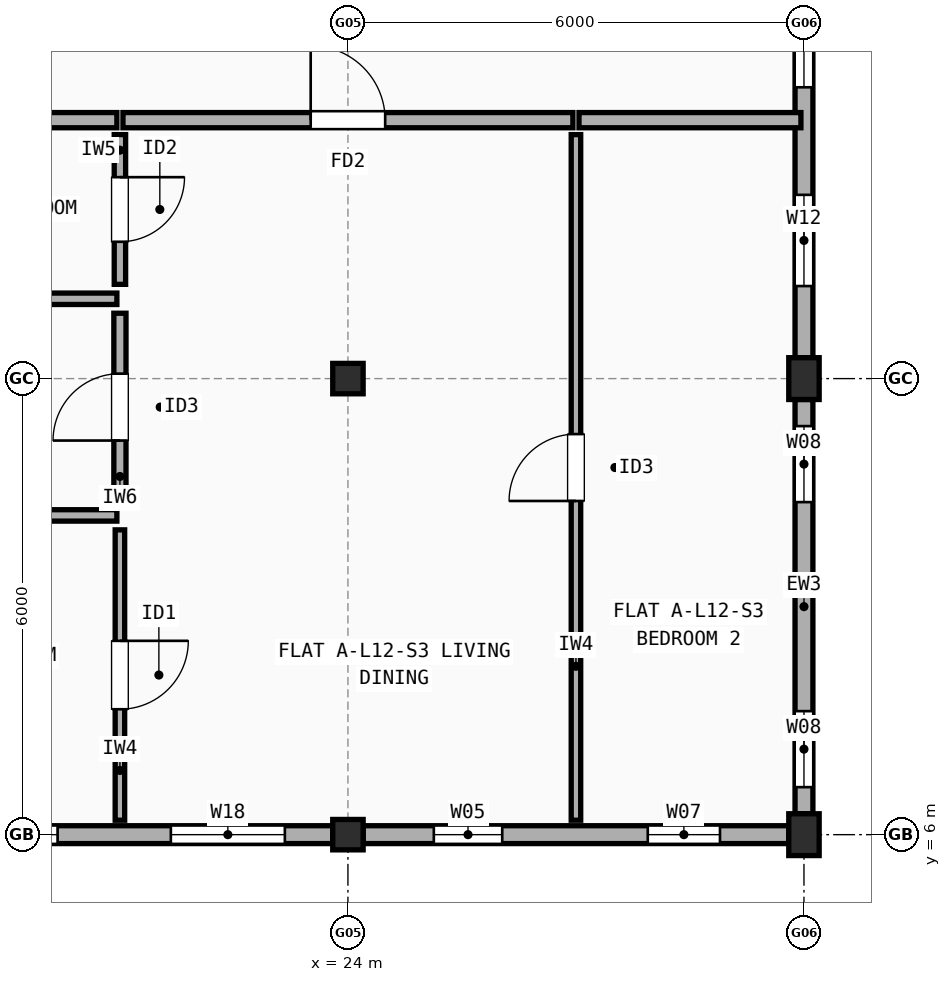
"""IFC4 building model, lengths in metres.
Left out: names, types, materials, properties, quantities, classifications, styles, units other than length and angle.
Written with IfcOpenShell. Run it as: python <this file> out.ifc"""

import sys

from ifc_helpers import new_model, si_unit, direction, frame, frame_2d, origin, origin_2d, place, context, subcontext, project, spatial, rectangle, extrude, element, fill, save


model = new_model("IFC4")
c1 = context("Model", 3, precision=1e-05, world=origin(), true_north=direction((0.0, 1.0)))
c2 = subcontext(c1, "Body", "Model", "MODEL_VIEW")
j1 = project(units=[si_unit("LENGTHUNIT", "METRE"), si_unit("PLANEANGLEUNIT", "RADIAN")], contexts=[c1])
p1 = place(None, origin())
s1 = spatial("IfcSite", under=j1, at=p1, CompositionType="ELEMENT")
p2 = place(p1, origin())
s2 = spatial("IfcBuilding", under=s1, at=p2, CompositionType="ELEMENT")
p3 = place(p2, frame((0.0, 0.0, 39.7)))
s3 = spatial("IfcBuildingStorey", under=s2, at=p3, CompositionType="ELEMENT", Elevation=39.7)
for number, where, z_axis, x_axis in (
    (1, (24.0, 6.0, 0.0), (0.0, 0.0, 1.0), (1.0, 0.0, 0.0)),
    (2, (24.0, 12.0, 0.0), (0.0, 0.0, 1.0), (1.0, 0.0, 0.0)),
):
    element("IfcColumn", number, at=place(p3, frame(where, z_axis=z_axis, x_axis=x_axis)), inside=s3, PredefinedType="COLUMN", context=c2, shape_type="SweptSolid", body=[
        extrude(rectangle(XDim=0.4, YDim=0.4, at=origin_2d()), origin(), (0.0, 0.0, 1.0), 3.0),
    ])
for number, where, z_axis, x_axis in (
    (3, (30.0, 6.0, 0.0), (0.0, 0.0, 1.0), (1.0, 0.0, 0.0)),
    (4, (30.0, 12.0, 0.0), (0.0, 0.0, 1.0), (1.0, 0.0, 0.0)),
):
    element("IfcColumn", number, at=place(p3, frame(where, z_axis=z_axis, x_axis=x_axis)), inside=s3, PredefinedType="COLUMN", context=c2, shape_type="SweptSolid", body=[
        extrude(rectangle(XDim=0.4, YDim=0.55, at=origin_2d()), origin(), (0.0, 0.0, 1.0), 3.0),
    ])
p4 = place(p3, frame((18.2, 6.0, 0.0), z_axis=(0.0, 0.0, 1.0), x_axis=(1.0, 0.0, 0.0)))
e5 = element("IfcWall", 5, at=p4, inside=s3, PredefinedType="STANDARD", context=c2, shape_type="SweptSolid", body=[
    extrude(rectangle(XDim=5.6, YDim=0.235, at=frame_2d((2.8, 0.0))), origin(), (0.0, 0.0, 1.0), 2.482),
])
p5 = place(p4, frame((0.78, 0.0, 0.9)))
e6 = element("IfcOpeningElement", 6, at=p5, cuts=e5, PredefinedType="OPENING", context=c2, shape_type="SweptSolid", body=[
    extrude(rectangle(XDim=1.2, YDim=1.35, at=frame_2d((0.6, 0.675))), frame((0.0, 0.127, 0.0), z_axis=(0.0, -1.0, 0.0), x_axis=(1.0, 0.0, 0.0)), (0.0, 0.0, 1.0), 0.255),
])
p6 = place(p4, frame((3.47, 0.0, 0.9)))
e7 = element("IfcOpeningElement", 7, at=p6, cuts=e5, PredefinedType="OPENING", context=c2, shape_type="SweptSolid", body=[
    extrude(rectangle(XDim=1.5, YDim=1.4, at=frame_2d((0.75, 0.7))), frame((0.0, 0.127, 0.0), z_axis=(0.0, -1.0, 0.0), x_axis=(1.0, 0.0, 0.0)), (0.0, 0.0, 1.0), 0.255),
])
p7 = place(p3, frame((24.2, 6.0, 0.0), z_axis=(0.0, 0.0, 1.0), x_axis=(1.0, 0.0, 0.0)))
e8 = element("IfcWall", 8, at=p7, inside=s3, PredefinedType="STANDARD", context=c2, shape_type="SweptSolid", body=[
    extrude(rectangle(XDim=5.6, YDim=0.235, at=frame_2d((2.8, 0.0))), origin(), (0.0, 0.0, 1.0), 2.482),
])
p8 = place(p7, frame((0.93, 0.0, 0.9)))
e9 = element("IfcOpeningElement", 9, at=p8, cuts=e8, PredefinedType="OPENING", context=c2, shape_type="SweptSolid", body=[
    extrude(rectangle(XDim=0.9, YDim=1.4, at=frame_2d((0.45, 0.7))), frame((0.0, 0.127, 0.0), z_axis=(0.0, -1.0, 0.0), x_axis=(1.0, 0.0, 0.0)), (0.0, 0.0, 1.0), 0.255),
])
p9 = place(p7, frame((3.745, 0.0, 0.9)))
e10 = element("IfcOpeningElement", 10, at=p9, cuts=e8, PredefinedType="OPENING", context=c2, shape_type="SweptSolid", body=[
    extrude(rectangle(XDim=0.95, YDim=1.35, at=frame_2d((0.475, 0.675))), frame((0.0, 0.127, 0.0), z_axis=(0.0, -1.0, 0.0), x_axis=(1.0, 0.0, 0.0)), (0.0, 0.0, 1.0), 0.255),
])
p10 = place(p3, frame((30.0, 6.275, 0.0), z_axis=(0.0, 0.0, 1.0), x_axis=(0.0, 1.0, 0.0)))
e11 = element("IfcWall", 11, at=p10, inside=s3, PredefinedType="STANDARD", context=c2, shape_type="SweptSolid", body=[
    extrude(rectangle(XDim=5.45, YDim=0.235, at=frame_2d((2.725, 0.0))), origin(), (0.0, 0.0, 1.0), 2.482),
])
p11 = place(p10, frame((0.35, 0.0, 0.9)))
e12 = element("IfcOpeningElement", 12, at=p11, cuts=e11, PredefinedType="OPENING", context=c2, shape_type="SweptSolid", body=[
    extrude(rectangle(XDim=1.0, YDim=1.4, at=frame_2d((0.5, 0.7))), frame((0.0, 0.127, 0.0), z_axis=(0.0, -1.0, 0.0), x_axis=(1.0, 0.0, 0.0)), (0.0, 0.0, 1.0), 0.255),
])
p12 = place(p10, frame((4.1, 0.0, 0.9)))
e13 = element("IfcOpeningElement", 13, at=p12, cuts=e11, PredefinedType="OPENING", context=c2, shape_type="SweptSolid", body=[
    extrude(rectangle(XDim=1.0, YDim=1.4, at=frame_2d((0.5, 0.7))), frame((0.0, 0.127, 0.0), z_axis=(0.0, -1.0, 0.0), x_axis=(1.0, 0.0, 0.0)), (0.0, 0.0, 1.0), 0.255),
])
p13 = place(p3, frame((30.0, 12.275, 0.0), z_axis=(0.0, 0.0, 1.0), x_axis=(0.0, 1.0, 0.0)))
e14 = element("IfcWall", 14, at=p13, inside=s3, PredefinedType="STANDARD", context=c2, shape_type="SweptSolid", body=[
    extrude(rectangle(XDim=5.45, YDim=0.235, at=frame_2d((2.725, 0.0))), origin(), (0.0, 0.0, 1.0), 2.482),
])
p14 = place(p13, frame((0.942, 0.0, 0.9)))
e15 = element("IfcOpeningElement", 15, at=p14, cuts=e14, PredefinedType="OPENING", context=c2, shape_type="SweptSolid", body=[
    extrude(rectangle(XDim=1.2, YDim=1.35, at=frame_2d((0.6, 0.675))), frame((0.0, 0.127, 0.0), z_axis=(0.0, -1.0, 0.0), x_axis=(1.0, 0.0, 0.0)), (0.0, 0.0, 1.0), 0.255),
])
p15 = place(p13, frame((3.558, 0.0, 0.9)))
e16 = element("IfcOpeningElement", 16, at=p15, cuts=e14, PredefinedType="OPENING", context=c2, shape_type="SweptSolid", body=[
    extrude(rectangle(XDim=1.5, YDim=1.4, at=frame_2d((0.75, 0.7))), frame((0.0, 0.127, 0.0), z_axis=(0.0, -1.0, 0.0), x_axis=(1.0, 0.0, 0.0)), (0.0, 0.0, 1.0), 0.255),
])
p16 = place(p3, frame((16.54, 15.4, 0.0), z_axis=(0.0, 0.0, 1.0), x_axis=(1.0, 0.0, 0.0)))
e17 = element("IfcWall", 17, at=p16, inside=s3, PredefinedType="SOLIDWALL", context=c2, shape_type="SweptSolid", body=[
    extrude(rectangle(XDim=4.42, YDim=0.2, at=frame_2d((2.21, 0.0))), origin(), (0.0, 0.0, 1.0), 2.548),
])
p17 = place(p3, frame((21.04, 15.4, 0.0), z_axis=(0.0, 0.0, 1.0), x_axis=(1.0, 0.0, 0.0)))
e18 = element("IfcWall", 18, at=p17, inside=s3, PredefinedType="SOLIDWALL", context=c2, shape_type="SweptSolid", body=[
    extrude(rectangle(XDim=5.92, YDim=0.2, at=frame_2d((2.96, 0.0))), origin(), (0.0, 0.0, 1.0), 2.548),
])
p18 = place(p17, frame((2.47, 0.0, 0.0)))
e19 = element("IfcOpeningElement", 19, at=p18, cuts=e18, PredefinedType="OPENING", context=c2, shape_type="SweptSolid", body=[
    extrude(rectangle(XDim=0.98, YDim=2.15, at=frame_2d((0.49, 1.075))), frame((0.0, 0.11, 0.0), z_axis=(0.0, -1.0, 0.0), x_axis=(1.0, 0.0, 0.0)), (0.0, 0.0, 1.0), 0.22),
])
p19 = place(p3, frame((21.0, 6.19, 0.0), z_axis=(0.0, 0.0, 1.0), x_axis=(0.0, 1.0, 0.0)))
e20 = element("IfcWall", 20, at=p19, inside=s3, PredefinedType="PARTITIONING", context=c2, shape_type="SweptSolid", body=[
    extrude(rectangle(XDim=3.82, YDim=0.125, at=frame_2d((1.91, 0.0))), origin(), (0.0, 0.0, 1.0), 3.0),
])
p20 = place(p19, frame((1.46, 0.0, 0.0)))
e21 = element("IfcOpeningElement", 21, at=p20, cuts=e20, PredefinedType="OPENING", context=c2, shape_type="SweptSolid", body=[
    extrude(rectangle(XDim=0.9, YDim=2.1, at=frame_2d((0.45, 1.05))), frame((0.0, 0.073, 0.0), z_axis=(0.0, -1.0, 0.0), x_axis=(1.0, 0.0, 0.0)), (0.0, 0.0, 1.0), 0.145),
])
p21 = place(p3, frame((21.0, 10.39, 0.0), z_axis=(0.0, 0.0, 1.0), x_axis=(0.0, 1.0, 0.0)))
e22 = element("IfcWall", 22, at=p21, inside=s3, PredefinedType="PLUMBINGWALL", context=c2, shape_type="SweptSolid", body=[
    extrude(rectangle(XDim=2.47, YDim=0.16, at=frame_2d((1.235, 0.0))), origin(), (0.0, 0.0, 1.0), 2.532),
])
p22 = place(p21, frame((0.795, 0.0, 0.0)))
e23 = element("IfcOpeningElement", 23, at=p22, cuts=e22, PredefinedType="OPENING", context=c2, shape_type="SweptSolid", body=[
    extrude(rectangle(XDim=0.88, YDim=2.1, at=frame_2d((0.44, 1.05))), frame((0.0, 0.09, 0.0), z_axis=(0.0, -1.0, 0.0), x_axis=(1.0, 0.0, 0.0)), (0.0, 0.0, 1.0), 0.18),
])
p23 = place(p3, frame((21.0, 13.24, 0.0), z_axis=(0.0, 0.0, 1.0), x_axis=(0.0, 1.0, 0.0)))
e24 = element("IfcWall", 24, at=p23, inside=s3, PredefinedType="PARTITIONING", context=c2, shape_type="SweptSolid", body=[
    extrude(rectangle(XDim=1.97, YDim=0.15, at=frame_2d((0.985, 0.0))), origin(), (0.0, 0.0, 1.0), 3.0),
])
p24 = place(p23, frame((0.56, 0.0, 0.0)))
e25 = element("IfcOpeningElement", 25, at=p24, cuts=e24, PredefinedType="OPENING", context=c2, shape_type="SweptSolid", body=[
    extrude(rectangle(XDim=0.85, YDim=2.1, at=frame_2d((0.425, 1.05))), frame((0.0, 0.085, 0.0), z_axis=(0.0, -1.0, 0.0), x_axis=(1.0, 0.0, 0.0)), (0.0, 0.0, 1.0), 0.17),
])
p25 = place(p3, frame((16.54, 10.2, 0.0), z_axis=(0.0, 0.0, 1.0), x_axis=(1.0, 0.0, 0.0)))
e26 = element("IfcWall", 26, at=p25, inside=s3, PredefinedType="PARTITIONING", context=c2, shape_type="SweptSolid", body=[
    extrude(rectangle(XDim=4.42, YDim=0.15, at=frame_2d((2.21, 0.0))), origin(), (0.0, 0.0, 1.0), 2.458),
])
p26 = place(p3, frame((16.54, 13.05, 0.0), z_axis=(0.0, 0.0, 1.0), x_axis=(1.0, 0.0, 0.0)))
e27 = element("IfcWall", 27, at=p26, inside=s3, PredefinedType="PARTITIONING", context=c2, shape_type="SweptSolid", body=[
    extrude(rectangle(XDim=4.42, YDim=0.15, at=frame_2d((2.21, 0.0))), origin(), (0.0, 0.0, 1.0), 2.548),
])
p27 = place(p3, frame((27.04, 15.4, 0.0), z_axis=(0.0, 0.0, 1.0), x_axis=(1.0, 0.0, 0.0)))
e28 = element("IfcWall", 28, at=p27, inside=s3, PredefinedType="SOLIDWALL", context=c2, shape_type="SweptSolid", body=[
    extrude(rectangle(XDim=2.92, YDim=0.2, at=frame_2d((1.46, 0.0))), origin(), (0.0, 0.0, 1.0), 2.482),
])
p28 = place(p3, frame((27.0, 6.19, 0.0), z_axis=(0.0, 0.0, 1.0), x_axis=(0.0, 1.0, 0.0)))
e29 = element("IfcWall", 29, at=p28, inside=s3, PredefinedType="PARTITIONING", context=c2, shape_type="SweptSolid", body=[
    extrude(rectangle(XDim=9.02, YDim=0.125, at=frame_2d((4.51, 0.0))), origin(), (0.0, 0.0, 1.0), 2.532),
])
p29 = place(p28, frame((4.2, 0.0, 0.0)))
e30 = element("IfcOpeningElement", 30, at=p29, cuts=e29, PredefinedType="OPENING", context=c2, shape_type="SweptSolid", body=[
    extrude(rectangle(XDim=0.88, YDim=2.1, at=frame_2d((0.44, 1.05))), frame((0.0, 0.073, 0.0), z_axis=(0.0, -1.0, 0.0), x_axis=(1.0, 0.0, 0.0)), (0.0, 0.0, 1.0), 0.145),
])
p30 = place(p5, origin())
e31 = element("IfcWindow", 31, at=p30, inside=s3, PartitioningType="SINGLE_PANEL", PredefinedType="WINDOW", context=c2, shape_type="SweptSolid", body=[
    extrude(rectangle(XDim=1.2, YDim=1.35, at=frame_2d((0.6, 0.675))), frame((0.0, 0.03, 0.0), z_axis=(0.0, -1.0, 0.0), x_axis=(1.0, 0.0, 0.0)), (0.0, 0.0, 1.0), 0.06),
])
fill(e6, e31)
p31 = place(p6, origin())
e32 = element("IfcWindow", 32, at=p31, inside=s3, PartitioningType="SINGLE_PANEL", PredefinedType="WINDOW", context=c2, shape_type="SweptSolid", body=[
    extrude(rectangle(XDim=1.5, YDim=1.4, at=frame_2d((0.75, 0.7))), frame((0.0, 0.03, 0.0), z_axis=(0.0, -1.0, 0.0), x_axis=(1.0, 0.0, 0.0)), (0.0, 0.0, 1.0), 0.06),
])
fill(e7, e32)
p32 = place(p8, origin())
e33 = element("IfcWindow", 33, at=p32, inside=s3, PartitioningType="SINGLE_PANEL", PredefinedType="WINDOW", context=c2, shape_type="SweptSolid", body=[
    extrude(rectangle(XDim=0.9, YDim=1.4, at=frame_2d((0.45, 0.7))), frame((0.0, 0.03, 0.0), z_axis=(0.0, -1.0, 0.0), x_axis=(1.0, 0.0, 0.0)), (0.0, 0.0, 1.0), 0.06),
])
fill(e9, e33)
p33 = place(p9, origin())
e34 = element("IfcWindow", 34, at=p33, inside=s3, PartitioningType="SINGLE_PANEL", PredefinedType="WINDOW", context=c2, shape_type="SweptSolid", body=[
    extrude(rectangle(XDim=0.95, YDim=1.35, at=frame_2d((0.475, 0.675))), frame((0.0, 0.03, 0.0), z_axis=(0.0, -1.0, 0.0), x_axis=(1.0, 0.0, 0.0)), (0.0, 0.0, 1.0), 0.06),
])
fill(e10, e34)
p34 = place(p11, origin())
e35 = element("IfcWindow", 35, at=p34, inside=s3, PartitioningType="SINGLE_PANEL", PredefinedType="WINDOW", context=c2, shape_type="SweptSolid", body=[
    extrude(rectangle(XDim=1.0, YDim=1.4, at=frame_2d((0.5, 0.7))), frame((0.0, 0.03, 0.0), z_axis=(0.0, -1.0, 0.0), x_axis=(1.0, 0.0, 0.0)), (0.0, 0.0, 1.0), 0.06),
])
fill(e12, e35)
p35 = place(p12, origin())
e36 = element("IfcWindow", 36, at=p35, inside=s3, PartitioningType="SINGLE_PANEL", PredefinedType="WINDOW", context=c2, shape_type="SweptSolid", body=[
    extrude(rectangle(XDim=1.0, YDim=1.4, at=frame_2d((0.5, 0.7))), frame((0.0, 0.03, 0.0), z_axis=(0.0, -1.0, 0.0), x_axis=(1.0, 0.0, 0.0)), (0.0, 0.0, 1.0), 0.06),
])
fill(e13, e36)
p36 = place(p14, origin())
e37 = element("IfcWindow", 37, at=p36, inside=s3, PartitioningType="SINGLE_PANEL", PredefinedType="WINDOW", context=c2, shape_type="SweptSolid", body=[
    extrude(rectangle(XDim=1.2, YDim=1.35, at=frame_2d((0.6, 0.675))), frame((0.0, 0.03, 0.0), z_axis=(0.0, -1.0, 0.0), x_axis=(1.0, 0.0, 0.0)), (0.0, 0.0, 1.0), 0.06),
])
fill(e15, e37)
p37 = place(p15, origin())
e38 = element("IfcWindow", 38, at=p37, inside=s3, PartitioningType="SINGLE_PANEL", PredefinedType="WINDOW", context=c2, shape_type="SweptSolid", body=[
    extrude(rectangle(XDim=1.5, YDim=1.4, at=frame_2d((0.75, 0.7))), frame((0.0, 0.03, 0.0), z_axis=(0.0, -1.0, 0.0), x_axis=(1.0, 0.0, 0.0)), (0.0, 0.0, 1.0), 0.06),
])
fill(e16, e38)
p38 = place(p18, origin())
e39 = element("IfcDoor", 39, at=p38, inside=s3, OperationType="SINGLE_SWING_LEFT", PredefinedType="DOOR", context=c2, shape_type="SweptSolid", body=[
    extrude(rectangle(XDim=0.98, YDim=2.15, at=frame_2d((0.49, 1.075))), frame((0.0, 0.025, 0.0), z_axis=(0.0, -1.0, 0.0), x_axis=(1.0, 0.0, 0.0)), (0.0, 0.0, 1.0), 0.05),
])
fill(e19, e39)
p39 = place(p20, origin())
e40 = element("IfcDoor", 40, at=p39, inside=s3, OperationType="SINGLE_SWING_RIGHT", PredefinedType="DOOR", context=c2, shape_type="SweptSolid", body=[
    extrude(rectangle(XDim=0.9, YDim=2.1, at=frame_2d((0.45, 1.05))), frame((0.0, 0.025, 0.0), z_axis=(0.0, -1.0, 0.0), x_axis=(1.0, 0.0, 0.0)), (0.0, 0.0, 1.0), 0.05),
])
fill(e21, e40)
p40 = place(p22, origin())
e41 = element("IfcDoor", 41, at=p40, inside=s3, OperationType="SINGLE_SWING_LEFT", PredefinedType="DOOR", context=c2, shape_type="SweptSolid", body=[
    extrude(rectangle(XDim=0.88, YDim=2.1, at=frame_2d((0.44, 1.05))), frame((0.0, 0.025, 0.0), z_axis=(0.0, -1.0, 0.0), x_axis=(1.0, 0.0, 0.0)), (0.0, 0.0, 1.0), 0.05),
])
fill(e23, e41)
p41 = place(p24, origin())
e42 = element("IfcDoor", 42, at=p41, inside=s3, OperationType="SINGLE_SWING_RIGHT", PredefinedType="DOOR", context=c2, shape_type="SweptSolid", body=[
    extrude(rectangle(XDim=0.85, YDim=2.1, at=frame_2d((0.425, 1.05))), frame((0.0, 0.025, 0.0), z_axis=(0.0, -1.0, 0.0), x_axis=(1.0, 0.0, 0.0)), (0.0, 0.0, 1.0), 0.05),
])
fill(e25, e42)
p42 = place(p29, origin())
e43 = element("IfcDoor", 43, at=p42, inside=s3, OperationType="SINGLE_SWING_LEFT", PredefinedType="DOOR", context=c2, shape_type="SweptSolid", body=[
    extrude(rectangle(XDim=0.88, YDim=2.1, at=frame_2d((0.44, 1.05))), frame((0.0, 0.025, 0.0), z_axis=(0.0, -1.0, 0.0), x_axis=(1.0, 0.0, 0.0)), (0.0, 0.0, 1.0), 0.05),
])
fill(e30, e43)
save(model, sys.argv[1])
